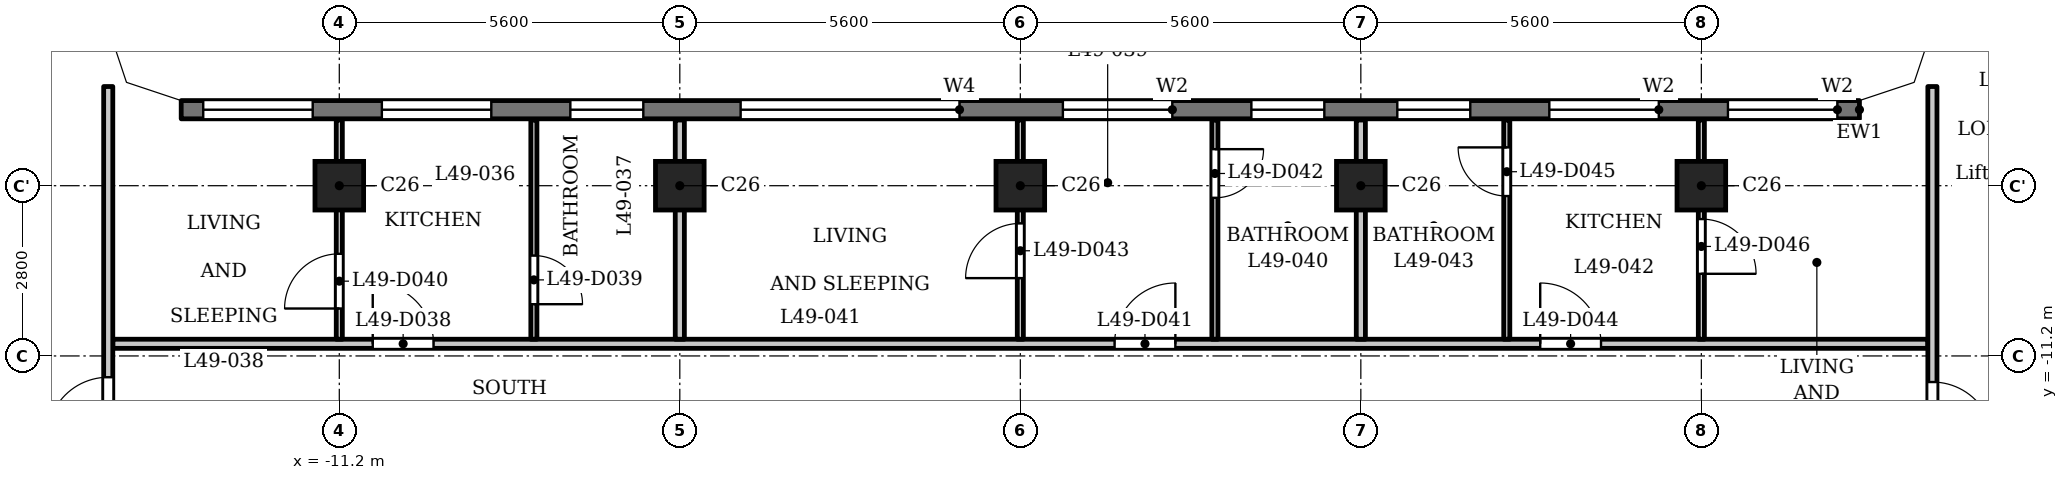
"""IFC4 building model, lengths in metres.
Left out: names, types, materials, properties, quantities, classifications, styles, units other than length and angle.
Written with IfcOpenShell. Run it as: python <this file> out.ifc"""

import sys

from ifc_helpers import new_model, si_unit, direction, frame, frame_2d, origin, origin_2d, place, context, subcontext, project, spatial, polyline, rectangle, outline, extrude, element, fill, save


model = new_model("IFC4")
c1 = context("Model", 3, precision=1e-05, world=origin(), true_north=direction((0.0, 1.0)))
c2 = subcontext(c1, "Body", "Model", "MODEL_VIEW")
j1 = project(units=[si_unit("LENGTHUNIT", "METRE"), si_unit("PLANEANGLEUNIT", "RADIAN")], contexts=[c1])
p1 = place(None, origin())
s1 = spatial("IfcSite", under=j1, at=p1, CompositionType="ELEMENT")
p2 = place(p1, origin())
s2 = spatial("IfcBuilding", under=s1, at=p2, CompositionType="ELEMENT")
p3 = place(p2, frame((0.0, 0.0, 192.4)))
s3 = spatial("IfcBuildingStorey", under=s2, at=p3, CompositionType="ELEMENT", Elevation=192.4)
for number, where, z_axis, x_axis in (
    (1, (-11.2, -8.4, 0.0), (0.0, 0.0, 1.0), (1.0, 0.0, 0.0)),
    (2, (-5.6, -8.4, 0.0), (0.0, 0.0, 1.0), (1.0, 0.0, 0.0)),
    (3, (0.0, -8.4, 0.0), (0.0, 0.0, 1.0), (1.0, 0.0, 0.0)),
    (4, (5.6, -8.4, 0.0), (0.0, 0.0, 1.0), (1.0, 0.0, 0.0)),
    (5, (11.2, -8.4, 0.0), (0.0, 0.0, 1.0), (1.0, 0.0, 0.0)),
):
    element("IfcColumn", number, at=place(p3, frame(where, z_axis=z_axis, x_axis=x_axis)), inside=s3, PredefinedType="COLUMN", context=c2, shape_type="SweptSolid", body=[
        extrude(rectangle(XDim=0.8, YDim=0.8, at=origin_2d()), origin(), (0.0, 0.0, 1.0), 3.5),
    ])
p4 = place(p3, frame((13.8, -7.15, 0.0), z_axis=(0.0, 0.0, 1.0), x_axis=(-1.0, 0.0, 0.0)))
e6 = element("IfcWall", 6, at=p4, inside=s3, PredefinedType="SOLIDWALL", context=c2, shape_type="SweptSolid", body=[
    extrude(rectangle(XDim=27.6, YDim=0.3, at=frame_2d((13.8, 0.0))), origin(), (0.0, 0.0, 1.0), 3.2),
])
p5 = place(p4, frame((0.363, 0.0, 0.9)))
e7 = element("IfcOpeningElement", 7, at=p5, cuts=e6, PredefinedType="OPENING", context=c2, shape_type="SweptSolid", body=[
    extrude(rectangle(XDim=1.8, YDim=1.25, at=frame_2d((0.9, 0.625))), frame((0.0, 0.16, 0.0), z_axis=(0.0, -1.0, 0.0), x_axis=(1.0, 0.0, 0.0)), (0.0, 0.0, 1.0), 0.32),
])
p6 = place(p4, frame((3.3, 0.0, 0.9)))
e8 = element("IfcOpeningElement", 8, at=p6, cuts=e6, PredefinedType="OPENING", context=c2, shape_type="SweptSolid", body=[
    extrude(rectangle(XDim=1.8, YDim=1.25, at=frame_2d((0.9, 0.625))), frame((0.0, 0.16, 0.0), z_axis=(0.0, -1.0, 0.0), x_axis=(1.0, 0.0, 0.0)), (0.0, 0.0, 1.0), 0.32),
])
p7 = place(p4, frame((6.4, 0.0, 0.6)))
e9 = element("IfcOpeningElement", 9, at=p7, cuts=e6, PredefinedType="OPENING", context=c2, shape_type="SweptSolid", body=[
    extrude(rectangle(XDim=1.2, YDim=1.55, at=frame_2d((0.6, 0.775))), frame((0.0, 0.16, 0.0), z_axis=(0.0, -1.0, 0.0), x_axis=(1.0, 0.0, 0.0)), (0.0, 0.0, 1.0), 0.32),
])
p8 = place(p4, frame((8.8, 0.0, 0.6)))
e10 = element("IfcOpeningElement", 10, at=p8, cuts=e6, PredefinedType="OPENING", context=c2, shape_type="SweptSolid", body=[
    extrude(rectangle(XDim=1.2, YDim=1.55, at=frame_2d((0.6, 0.775))), frame((0.0, 0.16, 0.0), z_axis=(0.0, -1.0, 0.0), x_axis=(1.0, 0.0, 0.0)), (0.0, 0.0, 1.0), 0.32),
])
p9 = place(p4, frame((11.3, 0.0, 0.9)))
e11 = element("IfcOpeningElement", 11, at=p9, cuts=e6, PredefinedType="OPENING", context=c2, shape_type="SweptSolid", body=[
    extrude(rectangle(XDim=1.8, YDim=1.25, at=frame_2d((0.9, 0.625))), frame((0.0, 0.16, 0.0), z_axis=(0.0, -1.0, 0.0), x_axis=(1.0, 0.0, 0.0)), (0.0, 0.0, 1.0), 0.32),
])
p10 = place(p4, frame((14.8, 0.0, 1.2)))
e12 = element("IfcOpeningElement", 12, at=p10, cuts=e6, PredefinedType="OPENING", context=c2, shape_type="SweptSolid", body=[
    extrude(rectangle(XDim=3.6, YDim=0.95, at=frame_2d((1.8, 0.475))), frame((0.0, 0.16, 0.0), z_axis=(0.0, -1.0, 0.0), x_axis=(1.0, 0.0, 0.0)), (0.0, 0.0, 1.0), 0.32),
])
p11 = place(p4, frame((20.0, 0.0, 0.6)))
e13 = element("IfcOpeningElement", 13, at=p11, cuts=e6, PredefinedType="OPENING", context=c2, shape_type="SweptSolid", body=[
    extrude(rectangle(XDim=1.2, YDim=1.55, at=frame_2d((0.6, 0.775))), frame((0.0, 0.16, 0.0), z_axis=(0.0, -1.0, 0.0), x_axis=(1.0, 0.0, 0.0)), (0.0, 0.0, 1.0), 0.32),
])
p12 = place(p4, frame((22.5, 0.0, 0.9)))
e14 = element("IfcOpeningElement", 14, at=p12, cuts=e6, PredefinedType="OPENING", context=c2, shape_type="SweptSolid", body=[
    extrude(rectangle(XDim=1.8, YDim=1.25, at=frame_2d((0.9, 0.625))), frame((0.0, 0.16, 0.0), z_axis=(0.0, -1.0, 0.0), x_axis=(1.0, 0.0, 0.0)), (0.0, 0.0, 1.0), 0.32),
])
p13 = place(p4, frame((25.438, 0.0, 0.9)))
e15 = element("IfcOpeningElement", 15, at=p13, cuts=e6, PredefinedType="OPENING", context=c2, shape_type="SweptSolid", body=[
    extrude(rectangle(XDim=1.8, YDim=1.25, at=frame_2d((0.9, 0.625))), frame((0.0, 0.16, 0.0), z_axis=(0.0, -1.0, 0.0), x_axis=(1.0, 0.0, 0.0)), (0.0, 0.0, 1.0), 0.32),
])
p14 = place(p3, frame((-14.925, -11.0, 0.0), z_axis=(0.0, 0.0, 1.0), x_axis=(1.0, 0.0, 0.0)))
e16 = element("IfcWall", 16, at=p14, inside=s3, PredefinedType="PARTITIONING", context=c2, shape_type="SweptSolid", body=[
    extrude(rectangle(XDim=29.85, YDim=0.15, at=frame_2d((14.925, 0.0))), origin(), (0.0, 0.0, 1.0), 3.2),
])
p15 = place(p14, frame((4.275, 0.0, 0.0)))
e17 = element("IfcOpeningElement", 17, at=p15, cuts=e16, PredefinedType="OPENING", context=c2, shape_type="SweptSolid", body=[
    extrude(rectangle(XDim=1.0, YDim=2.1, at=frame_2d((0.5, 1.05))), frame((0.0, 0.085, 0.0), z_axis=(0.0, -1.0, 0.0), x_axis=(1.0, 0.0, 0.0)), (0.0, 0.0, 1.0), 0.17),
])
p16 = place(p14, frame((16.475, 0.0, 0.0)))
e18 = element("IfcOpeningElement", 18, at=p16, cuts=e16, PredefinedType="OPENING", context=c2, shape_type="SweptSolid", body=[
    extrude(rectangle(XDim=1.0, YDim=2.1, at=frame_2d((0.5, 1.05))), frame((0.0, 0.085, 0.0), z_axis=(0.0, -1.0, 0.0), x_axis=(1.0, 0.0, 0.0)), (0.0, 0.0, 1.0), 0.17),
])
p17 = place(p14, frame((23.475, 0.0, 0.0)))
e19 = element("IfcOpeningElement", 19, at=p17, cuts=e16, PredefinedType="OPENING", context=c2, shape_type="SweptSolid", body=[
    extrude(rectangle(XDim=1.0, YDim=2.1, at=frame_2d((0.5, 1.05))), frame((0.0, 0.085, 0.0), z_axis=(0.0, -1.0, 0.0), x_axis=(1.0, 0.0, 0.0)), (0.0, 0.0, 1.0), 0.17),
])
p18 = place(p3, frame((-15.0, -13.125, 0.0), z_axis=(0.0, 0.0, 1.0), x_axis=(0.0, 1.0, 0.0)))
e20 = element("IfcWall", 20, at=p18, inside=s3, PredefinedType="PARTITIONING", context=c2, shape_type="SweptSolid", body=[
    extrude(rectangle(XDim=6.356, YDim=0.15, at=frame_2d((3.178, 0.0))), origin(), (0.0, 0.0, 1.0), 3.2),
])
p19 = place(p18, frame((0.575, 0.0, 0.0)))
e21 = element("IfcOpeningElement", 21, at=p19, cuts=e20, PredefinedType="OPENING", context=c2, shape_type="SweptSolid", body=[
    extrude(rectangle(XDim=1.0, YDim=2.1, at=frame_2d((0.5, 1.05))), frame((0.0, 0.085, 0.0), z_axis=(0.0, -1.0, 0.0), x_axis=(1.0, 0.0, 0.0)), (0.0, 0.0, 1.0), 0.17),
])
p20 = place(p3, frame((-11.2, -10.925, 0.0), z_axis=(0.0, 0.0, 1.0), x_axis=(0.0, 1.0, 0.0)))
e22 = element("IfcWall", 22, at=p20, inside=s3, PredefinedType="PARTITIONING", context=c2, shape_type="SweptSolid", body=[
    extrude(rectangle(XDim=3.605, YDim=0.1, at=frame_2d((1.802, 0.0))), origin(), (0.0, 0.0, 1.0), 3.2),
])
p21 = place(p20, frame((0.505, 0.0, 0.0)))
e23 = element("IfcOpeningElement", 23, at=p21, cuts=e22, PredefinedType="OPENING", context=c2, shape_type="SweptSolid", body=[
    extrude(rectangle(XDim=0.9, YDim=2.1, at=frame_2d((0.45, 1.05))), frame((0.0, 0.06, 0.0), z_axis=(0.0, -1.0, 0.0), x_axis=(1.0, 0.0, 0.0)), (0.0, 0.0, 1.0), 0.12),
])
p22 = place(p3, frame((-8.0, -10.925, 0.0), z_axis=(0.0, 0.0, 1.0), x_axis=(0.0, 1.0, 0.0)))
e24 = element("IfcWall", 24, at=p22, inside=s3, PredefinedType="PARTITIONING", context=c2, shape_type="SweptSolid", body=[
    extrude(rectangle(XDim=3.605, YDim=0.1, at=frame_2d((1.802, 0.0))), origin(), (0.0, 0.0, 1.0), 3.2),
])
p23 = place(p22, frame((0.576, 0.0, 0.0)))
e25 = element("IfcOpeningElement", 25, at=p23, cuts=e24, PredefinedType="OPENING", context=c2, shape_type="SweptSolid", body=[
    extrude(rectangle(XDim=0.8, YDim=2.1, at=frame_2d((0.4, 1.05))), frame((0.0, 0.06, 0.0), z_axis=(0.0, -1.0, 0.0), x_axis=(1.0, 0.0, 0.0)), (0.0, 0.0, 1.0), 0.12),
])
p24 = place(p3, frame((-5.6, -10.925, 0.0), z_axis=(0.0, 0.0, 1.0), x_axis=(0.0, 1.0, 0.0)))
e26 = element("IfcWall", 26, at=p24, inside=s3, PredefinedType="PARTITIONING", context=c2, shape_type="SweptSolid", body=[
    extrude(rectangle(XDim=3.605, YDim=0.15, at=frame_2d((1.802, 0.0))), origin(), (0.0, 0.0, 1.0), 3.2),
])
p25 = place(p3, frame((0.0, -10.925, 0.0), z_axis=(0.0, 0.0, 1.0), x_axis=(0.0, 1.0, 0.0)))
e27 = element("IfcWall", 27, at=p25, inside=s3, PredefinedType="PARTITIONING", context=c2, shape_type="SweptSolid", body=[
    extrude(rectangle(XDim=3.605, YDim=0.1, at=frame_2d((1.802, 0.0))), origin(), (0.0, 0.0, 1.0), 3.2),
])
p26 = place(p25, frame((1.005, 0.0, 0.0)))
e28 = element("IfcOpeningElement", 28, at=p26, cuts=e27, PredefinedType="OPENING", context=c2, shape_type="SweptSolid", body=[
    extrude(rectangle(XDim=0.9, YDim=2.1, at=frame_2d((0.45, 1.05))), frame((0.0, 0.06, 0.0), z_axis=(0.0, -1.0, 0.0), x_axis=(1.0, 0.0, 0.0)), (0.0, 0.0, 1.0), 0.12),
])
p27 = place(p3, frame((3.2, -10.925, 0.0), z_axis=(0.0, 0.0, 1.0), x_axis=(0.0, 1.0, 0.0)))
e29 = element("IfcWall", 29, at=p27, inside=s3, PredefinedType="PARTITIONING", context=c2, shape_type="SweptSolid", body=[
    extrude(rectangle(XDim=3.605, YDim=0.1, at=frame_2d((1.802, 0.0))), origin(), (0.0, 0.0, 1.0), 3.2),
])
p28 = place(p27, frame((2.326, 0.0, 0.0)))
e30 = element("IfcOpeningElement", 30, at=p28, cuts=e29, PredefinedType="OPENING", context=c2, shape_type="SweptSolid", body=[
    extrude(rectangle(XDim=0.8, YDim=2.1, at=frame_2d((0.4, 1.05))), frame((0.0, 0.06, 0.0), z_axis=(0.0, -1.0, 0.0), x_axis=(1.0, 0.0, 0.0)), (0.0, 0.0, 1.0), 0.12),
])
p29 = place(p3, frame((5.6, -10.925, 0.0), z_axis=(0.0, 0.0, 1.0), x_axis=(0.0, 1.0, 0.0)))
e31 = element("IfcWall", 31, at=p29, inside=s3, PredefinedType="PARTITIONING", context=c2, shape_type="SweptSolid", body=[
    extrude(rectangle(XDim=3.605, YDim=0.15, at=frame_2d((1.802, 0.0))), origin(), (0.0, 0.0, 1.0), 3.2),
])
p30 = place(p3, frame((8.0, -10.925, 0.0), z_axis=(0.0, 0.0, 1.0), x_axis=(0.0, 1.0, 0.0)))
e32 = element("IfcWall", 32, at=p30, inside=s3, PredefinedType="PARTITIONING", context=c2, shape_type="SweptSolid", body=[
    extrude(rectangle(XDim=3.605, YDim=0.1, at=frame_2d((1.802, 0.0))), origin(), (0.0, 0.0, 1.0), 3.2),
])
p31 = place(p30, frame((2.355, 0.0, 0.0)))
e33 = element("IfcOpeningElement", 33, at=p31, cuts=e32, PredefinedType="OPENING", context=c2, shape_type="SweptSolid", body=[
    extrude(rectangle(XDim=0.8, YDim=2.1, at=frame_2d((0.4, 1.05))), frame((0.0, 0.06, 0.0), z_axis=(0.0, -1.0, 0.0), x_axis=(1.0, 0.0, 0.0)), (0.0, 0.0, 1.0), 0.12),
])
p32 = place(p3, frame((11.2, -10.925, 0.0), z_axis=(0.0, 0.0, 1.0), x_axis=(0.0, 1.0, 0.0)))
e34 = element("IfcWall", 34, at=p32, inside=s3, PredefinedType="PARTITIONING", context=c2, shape_type="SweptSolid", body=[
    extrude(rectangle(XDim=3.605, YDim=0.1, at=frame_2d((1.802, 0.0))), origin(), (0.0, 0.0, 1.0), 3.2),
])
p33 = place(p32, frame((1.076, 0.0, 0.0)))
e35 = element("IfcOpeningElement", 35, at=p33, cuts=e34, PredefinedType="OPENING", context=c2, shape_type="SweptSolid", body=[
    extrude(rectangle(XDim=0.9, YDim=2.1, at=frame_2d((0.45, 1.05))), frame((0.0, 0.06, 0.0), z_axis=(0.0, -1.0, 0.0), x_axis=(1.0, 0.0, 0.0)), (0.0, 0.0, 1.0), 0.12),
])
p34 = place(p3, frame((15.0, -13.125, 0.0), z_axis=(0.0, 0.0, 1.0), x_axis=(0.0, 1.0, 0.0)))
e36 = element("IfcWall", 36, at=p34, inside=s3, PredefinedType="PARTITIONING", context=c2, shape_type="SweptSolid", body=[
    extrude(rectangle(XDim=6.356, YDim=0.15, at=frame_2d((3.178, 0.0))), origin(), (0.0, 0.0, 1.0), 3.2),
])
p35 = place(p34, frame((0.496, 0.0, 0.0)))
e37 = element("IfcOpeningElement", 37, at=p35, cuts=e36, PredefinedType="OPENING", context=c2, shape_type="SweptSolid", body=[
    extrude(rectangle(XDim=1.0, YDim=2.1, at=frame_2d((0.5, 1.05))), frame((0.0, 0.085, 0.0), z_axis=(0.0, -1.0, 0.0), x_axis=(1.0, 0.0, 0.0)), (0.0, 0.0, 1.0), 0.17),
])
p36 = place(p3, origin())
e38 = element("IfcWall", 38, at=p36, inside=s3, PredefinedType="SOLIDWALL", context=c2, shape_type="SweptSolid", body=[
    extrude(outline(polyline([(14.937, -6.937), (15.3, -5.849), (15.3, -5.8), (15.0, -5.8), (14.7, -6.7), (13.8, -7.0), (13.8, -7.3), (13.849, -7.3), (14.937, -6.937)])), origin(), (0.0, 0.0, 1.0), 3.2),
])
e39 = element("IfcWall", 39, at=p36, inside=s3, PredefinedType="SOLIDWALL", context=c2, shape_type="SweptSolid", body=[
    extrude(outline(polyline([(-14.937, -6.937), (-13.849, -7.3), (-13.8, -7.3), (-13.8, -7.0), (-14.7, -6.7), (-15.0, -5.8), (-15.3, -5.8), (-15.3, -5.849), (-14.937, -6.937)])), origin(), (0.0, 0.0, 1.0), 3.2),
])
p37 = place(p19, origin())
e40 = element("IfcDoor", 40, at=p37, inside=s3, OperationType="SINGLE_SWING_RIGHT", PredefinedType="DOOR", context=c2, shape_type="SweptSolid", body=[
    extrude(rectangle(XDim=1.0, YDim=2.1, at=frame_2d((0.5, 1.05))), frame((0.0, 0.025, 0.0), z_axis=(0.0, -1.0, 0.0), x_axis=(1.0, 0.0, 0.0)), (0.0, 0.0, 1.0), 0.05),
])
fill(e21, e40)
p38 = place(p35, origin())
e41 = element("IfcDoor", 41, at=p38, inside=s3, OperationType="SINGLE_SWING_LEFT", PredefinedType="DOOR", context=c2, shape_type="SweptSolid", body=[
    extrude(rectangle(XDim=1.0, YDim=2.1, at=frame_2d((0.5, 1.05))), frame((0.0, 0.025, 0.0), z_axis=(0.0, -1.0, 0.0), x_axis=(1.0, 0.0, 0.0)), (0.0, 0.0, 1.0), 0.05),
])
fill(e37, e41)
p39 = place(p15, origin())
e42 = element("IfcDoor", 42, at=p39, inside=s3, OperationType="SINGLE_SWING_RIGHT", PredefinedType="DOOR", context=c2, shape_type="SweptSolid", body=[
    extrude(rectangle(XDim=1.0, YDim=2.1, at=frame_2d((0.5, 1.05))), frame((0.0, 0.025, 0.0), z_axis=(0.0, -1.0, 0.0), x_axis=(1.0, 0.0, 0.0)), (0.0, 0.0, 1.0), 0.05),
])
fill(e17, e42)
p40 = place(p23, origin())
e43 = element("IfcDoor", 43, at=p40, inside=s3, OperationType="SINGLE_SWING_LEFT", PredefinedType="DOOR", context=c2, shape_type="SweptSolid", body=[
    extrude(rectangle(XDim=0.8, YDim=2.1, at=frame_2d((0.4, 1.05))), frame((0.0, 0.025, 0.0), z_axis=(0.0, -1.0, 0.0), x_axis=(1.0, 0.0, 0.0)), (0.0, 0.0, 1.0), 0.05),
])
fill(e25, e43)
p41 = place(p21, origin())
e44 = element("IfcDoor", 44, at=p41, inside=s3, OperationType="SINGLE_SWING_RIGHT", PredefinedType="DOOR", context=c2, shape_type="SweptSolid", body=[
    extrude(rectangle(XDim=0.9, YDim=2.1, at=frame_2d((0.45, 1.05))), frame((0.0, 0.025, 0.0), z_axis=(0.0, -1.0, 0.0), x_axis=(1.0, 0.0, 0.0)), (0.0, 0.0, 1.0), 0.05),
])
fill(e23, e44)
p42 = place(p16, origin())
e45 = element("IfcDoor", 45, at=p42, inside=s3, OperationType="SINGLE_SWING_LEFT", PredefinedType="DOOR", context=c2, shape_type="SweptSolid", body=[
    extrude(rectangle(XDim=1.0, YDim=2.1, at=frame_2d((0.5, 1.05))), frame((0.0, 0.025, 0.0), z_axis=(0.0, -1.0, 0.0), x_axis=(1.0, 0.0, 0.0)), (0.0, 0.0, 1.0), 0.05),
])
fill(e18, e45)
p43 = place(p28, origin())
e46 = element("IfcDoor", 46, at=p43, inside=s3, OperationType="SINGLE_SWING_RIGHT", PredefinedType="DOOR", context=c2, shape_type="SweptSolid", body=[
    extrude(rectangle(XDim=0.8, YDim=2.1, at=frame_2d((0.4, 1.05))), frame((0.0, 0.025, 0.0), z_axis=(0.0, -1.0, 0.0), x_axis=(1.0, 0.0, 0.0)), (0.0, 0.0, 1.0), 0.05),
])
fill(e30, e46)
p44 = place(p26, origin())
e47 = element("IfcDoor", 47, at=p44, inside=s3, OperationType="SINGLE_SWING_RIGHT", PredefinedType="DOOR", context=c2, shape_type="SweptSolid", body=[
    extrude(rectangle(XDim=0.9, YDim=2.1, at=frame_2d((0.45, 1.05))), frame((0.0, 0.025, 0.0), z_axis=(0.0, -1.0, 0.0), x_axis=(1.0, 0.0, 0.0)), (0.0, 0.0, 1.0), 0.05),
])
fill(e28, e47)
p45 = place(p17, origin())
e48 = element("IfcDoor", 48, at=p45, inside=s3, OperationType="SINGLE_SWING_RIGHT", PredefinedType="DOOR", context=c2, shape_type="SweptSolid", body=[
    extrude(rectangle(XDim=1.0, YDim=2.1, at=frame_2d((0.5, 1.05))), frame((0.0, 0.025, 0.0), z_axis=(0.0, -1.0, 0.0), x_axis=(1.0, 0.0, 0.0)), (0.0, 0.0, 1.0), 0.05),
])
fill(e19, e48)
p46 = place(p31, origin())
e49 = element("IfcDoor", 49, at=p46, inside=s3, OperationType="SINGLE_SWING_LEFT", PredefinedType="DOOR", context=c2, shape_type="SweptSolid", body=[
    extrude(rectangle(XDim=0.8, YDim=2.1, at=frame_2d((0.4, 1.05))), frame((0.0, 0.025, 0.0), z_axis=(0.0, -1.0, 0.0), x_axis=(1.0, 0.0, 0.0)), (0.0, 0.0, 1.0), 0.05),
])
fill(e33, e49)
p47 = place(p33, origin())
e50 = element("IfcDoor", 50, at=p47, inside=s3, OperationType="SINGLE_SWING_LEFT", PredefinedType="DOOR", context=c2, shape_type="SweptSolid", body=[
    extrude(rectangle(XDim=0.9, YDim=2.1, at=frame_2d((0.45, 1.05))), frame((0.0, 0.025, 0.0), z_axis=(0.0, -1.0, 0.0), x_axis=(1.0, 0.0, 0.0)), (0.0, 0.0, 1.0), 0.05),
])
fill(e35, e50)
p48 = place(p5, origin())
e51 = element("IfcWindow", 51, at=p48, inside=s3, PartitioningType="SINGLE_PANEL", PredefinedType="WINDOW", context=c2, shape_type="SweptSolid", body=[
    extrude(rectangle(XDim=1.8, YDim=1.25, at=frame_2d((0.9, 0.625))), frame((0.0, 0.03, 0.0), z_axis=(0.0, -1.0, 0.0), x_axis=(1.0, 0.0, 0.0)), (0.0, 0.0, 1.0), 0.06),
])
fill(e7, e51)
p49 = place(p6, origin())
e52 = element("IfcWindow", 52, at=p49, inside=s3, PartitioningType="SINGLE_PANEL", PredefinedType="WINDOW", context=c2, shape_type="SweptSolid", body=[
    extrude(rectangle(XDim=1.8, YDim=1.25, at=frame_2d((0.9, 0.625))), frame((0.0, 0.03, 0.0), z_axis=(0.0, -1.0, 0.0), x_axis=(1.0, 0.0, 0.0)), (0.0, 0.0, 1.0), 0.06),
])
fill(e8, e52)
p50 = place(p7, origin())
e53 = element("IfcWindow", 53, at=p50, inside=s3, PartitioningType="SINGLE_PANEL", PredefinedType="WINDOW", context=c2, shape_type="SweptSolid", body=[
    extrude(rectangle(XDim=1.2, YDim=1.55, at=frame_2d((0.6, 0.775))), frame((0.0, 0.03, 0.0), z_axis=(0.0, -1.0, 0.0), x_axis=(1.0, 0.0, 0.0)), (0.0, 0.0, 1.0), 0.06),
])
fill(e9, e53)
p51 = place(p8, origin())
e54 = element("IfcWindow", 54, at=p51, inside=s3, PartitioningType="SINGLE_PANEL", PredefinedType="WINDOW", context=c2, shape_type="SweptSolid", body=[
    extrude(rectangle(XDim=1.2, YDim=1.55, at=frame_2d((0.6, 0.775))), frame((0.0, 0.03, 0.0), z_axis=(0.0, -1.0, 0.0), x_axis=(1.0, 0.0, 0.0)), (0.0, 0.0, 1.0), 0.06),
])
fill(e10, e54)
p52 = place(p9, origin())
e55 = element("IfcWindow", 55, at=p52, inside=s3, PartitioningType="SINGLE_PANEL", PredefinedType="WINDOW", context=c2, shape_type="SweptSolid", body=[
    extrude(rectangle(XDim=1.8, YDim=1.25, at=frame_2d((0.9, 0.625))), frame((0.0, 0.03, 0.0), z_axis=(0.0, -1.0, 0.0), x_axis=(1.0, 0.0, 0.0)), (0.0, 0.0, 1.0), 0.06),
])
fill(e11, e55)
p53 = place(p10, origin())
e56 = element("IfcWindow", 56, at=p53, inside=s3, PartitioningType="SINGLE_PANEL", PredefinedType="WINDOW", context=c2, shape_type="SweptSolid", body=[
    extrude(rectangle(XDim=3.6, YDim=0.95, at=frame_2d((1.8, 0.475))), frame((0.0, 0.03, 0.0), z_axis=(0.0, -1.0, 0.0), x_axis=(1.0, 0.0, 0.0)), (0.0, 0.0, 1.0), 0.06),
])
fill(e12, e56)
p54 = place(p11, origin())
e57 = element("IfcWindow", 57, at=p54, inside=s3, PartitioningType="SINGLE_PANEL", PredefinedType="WINDOW", context=c2, shape_type="SweptSolid", body=[
    extrude(rectangle(XDim=1.2, YDim=1.55, at=frame_2d((0.6, 0.775))), frame((0.0, 0.03, 0.0), z_axis=(0.0, -1.0, 0.0), x_axis=(1.0, 0.0, 0.0)), (0.0, 0.0, 1.0), 0.06),
])
fill(e13, e57)
p55 = place(p12, origin())
e58 = element("IfcWindow", 58, at=p55, inside=s3, PartitioningType="SINGLE_PANEL", PredefinedType="WINDOW", context=c2, shape_type="SweptSolid", body=[
    extrude(rectangle(XDim=1.8, YDim=1.25, at=frame_2d((0.9, 0.625))), frame((0.0, 0.03, 0.0), z_axis=(0.0, -1.0, 0.0), x_axis=(1.0, 0.0, 0.0)), (0.0, 0.0, 1.0), 0.06),
])
fill(e14, e58)
p56 = place(p13, origin())
e59 = element("IfcWindow", 59, at=p56, inside=s3, PartitioningType="SINGLE_PANEL", PredefinedType="WINDOW", context=c2, shape_type="SweptSolid", body=[
    extrude(rectangle(XDim=1.8, YDim=1.25, at=frame_2d((0.9, 0.625))), frame((0.0, 0.03, 0.0), z_axis=(0.0, -1.0, 0.0), x_axis=(1.0, 0.0, 0.0)), (0.0, 0.0, 1.0), 0.06),
])
fill(e15, e59)
save(model, sys.argv[1])
